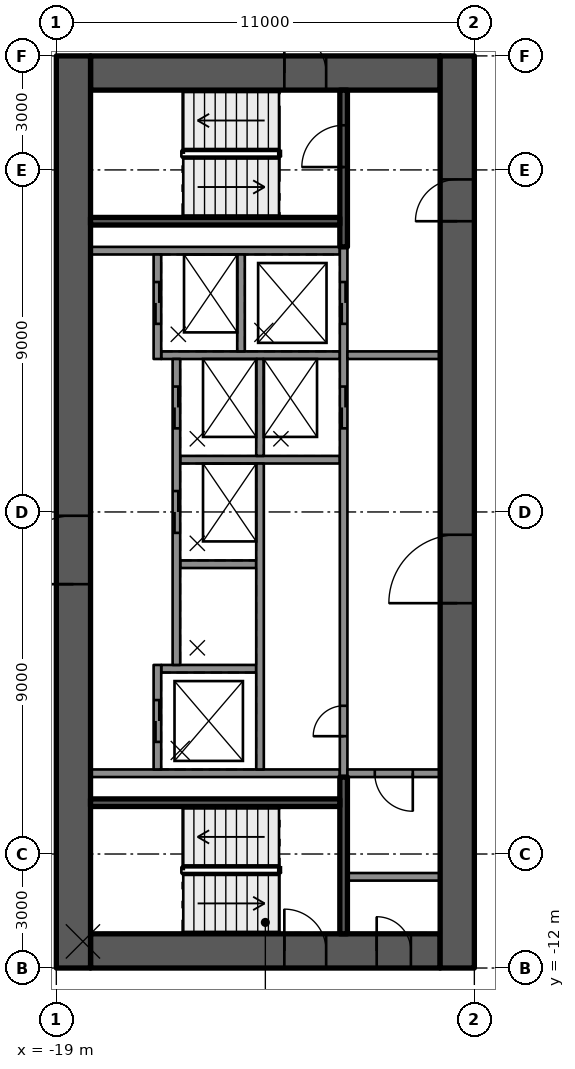
"""IFC4 building model, lengths in metres.
Left out: names, types, materials, properties, quantities, classifications, styles, units other than length and angle.
Written with IfcOpenShell. Run it as: python <this file> out.ifc"""

import sys

from ifc_helpers import new_model, si_unit, direction, frame, frame_2d, origin, place, context, subcontext, project, spatial, rectangle, extrude, element, fill, save


model = new_model("IFC4")
c1 = context("Model", 3, precision=1e-05, world=origin(), true_north=direction((0.0, 1.0)))
c2 = subcontext(c1, "Body", "Model", "MODEL_VIEW")
j1 = project(units=[si_unit("LENGTHUNIT", "METRE"), si_unit("PLANEANGLEUNIT", "RADIAN")], contexts=[c1])
p1 = place(None, origin())
s1 = spatial("IfcSite", under=j1, at=p1, CompositionType="ELEMENT")
p2 = place(p1, origin())
s2 = spatial("IfcBuilding", under=s1, at=p2, CompositionType="ELEMENT")
p3 = place(p2, frame((0.0, 0.0, 188.6)))
s3 = spatial("IfcBuildingStorey", under=s2, at=p3, CompositionType="ELEMENT", Elevation=188.6)
p4 = place(p3, frame((-18.1, 11.55, 0.0), z_axis=(0.0, 0.0, 1.0), x_axis=(1.0, 0.0, 0.0)))
e1 = element("IfcWall", 1, at=p4, inside=s3, PredefinedType="SHEAR", context=c2, shape_type="SweptSolid", body=[
    extrude(rectangle(XDim=9.2, YDim=0.9, at=frame_2d((4.6, 0.0))), origin(), (0.0, 0.0, 1.0), 3.5),
])
p5 = place(p4, frame((5.1, 0.0, 0.0)))
e2 = element("IfcOpeningElement", 2, at=p5, cuts=e1, PredefinedType="OPENING", context=c2, shape_type="SweptSolid", body=[
    extrude(rectangle(XDim=1.1, YDim=2.1, at=frame_2d((0.55, 1.05))), frame((0.0, 0.46, 0.0), z_axis=(0.0, -1.0, 0.0), x_axis=(1.0, 0.0, 0.0)), (0.0, 0.0, 1.0), 0.92),
])
p6 = place(p3, frame((-18.1, -11.55, 0.0), z_axis=(0.0, 0.0, 1.0), x_axis=(1.0, 0.0, 0.0)))
e3 = element("IfcWall", 3, at=p6, inside=s3, PredefinedType="SHEAR", context=c2, shape_type="SweptSolid", body=[
    extrude(rectangle(XDim=9.2, YDim=0.9, at=frame_2d((4.6, 0.0))), origin(), (0.0, 0.0, 1.0), 3.5),
])
p7 = place(p6, frame((5.1, 0.0, 0.0)))
e4 = element("IfcOpeningElement", 4, at=p7, cuts=e3, PredefinedType="OPENING", context=c2, shape_type="SweptSolid", body=[
    extrude(rectangle(XDim=1.1, YDim=2.1, at=frame_2d((0.55, 1.05))), frame((0.0, 0.46, 0.0), z_axis=(0.0, -1.0, 0.0), x_axis=(1.0, 0.0, 0.0)), (0.0, 0.0, 1.0), 0.92),
])
p8 = place(p6, frame((7.53, 0.0, 0.0)))
e5 = element("IfcOpeningElement", 5, at=p8, cuts=e3, PredefinedType="OPENING", context=c2, shape_type="SweptSolid", body=[
    extrude(rectangle(XDim=0.9, YDim=2.1, at=frame_2d((0.45, 1.05))), frame((0.0, 0.46, 0.0), z_axis=(0.0, -1.0, 0.0), x_axis=(1.0, 0.0, 0.0)), (0.0, 0.0, 1.0), 0.92),
])
p9 = place(p3, frame((-18.55, -12.0, 0.0), z_axis=(0.0, 0.0, 1.0), x_axis=(0.0, 1.0, 0.0)))
e6 = element("IfcWall", 6, at=p9, inside=s3, PredefinedType="SHEAR", context=c2, shape_type="SweptSolid", body=[
    extrude(rectangle(XDim=24.0, YDim=0.9, at=frame_2d((12.0, 0.0))), origin(), (0.0, 0.0, 1.0), 3.5),
])
p10 = place(p9, frame((10.1, 0.0, 0.0)))
e7 = element("IfcOpeningElement", 7, at=p10, cuts=e6, PredefinedType="OPENING", context=c2, shape_type="SweptSolid", body=[
    extrude(rectangle(XDim=1.8, YDim=2.1, at=frame_2d((0.9, 1.05))), frame((0.0, 0.46, 0.0), z_axis=(0.0, -1.0, 0.0), x_axis=(1.0, 0.0, 0.0)), (0.0, 0.0, 1.0), 0.92),
])
p11 = place(p3, frame((-8.45, -12.0, 0.0), z_axis=(0.0, 0.0, 1.0), x_axis=(0.0, 1.0, 0.0)))
e8 = element("IfcWall", 8, at=p11, inside=s3, PredefinedType="SHEAR", context=c2, shape_type="SweptSolid", body=[
    extrude(rectangle(XDim=24.0, YDim=0.9, at=frame_2d((12.0, 0.0))), origin(), (0.0, 0.0, 1.0), 3.5),
])
p12 = place(p11, frame((9.6, 0.0, 0.0)))
e9 = element("IfcOpeningElement", 9, at=p12, cuts=e8, PredefinedType="OPENING", context=c2, shape_type="SweptSolid", body=[
    extrude(rectangle(XDim=1.8, YDim=2.1, at=frame_2d((0.9, 1.05))), frame((0.0, 0.46, 0.0), z_axis=(0.0, -1.0, 0.0), x_axis=(1.0, 0.0, 0.0)), (0.0, 0.0, 1.0), 0.92),
])
p13 = place(p11, frame((19.65, 0.0, 0.0)))
e10 = element("IfcOpeningElement", 10, at=p13, cuts=e8, PredefinedType="OPENING", context=c2, shape_type="SweptSolid", body=[
    extrude(rectangle(XDim=1.1, YDim=2.1, at=frame_2d((0.55, 1.05))), frame((0.0, 0.46, 0.0), z_axis=(0.0, -1.0, 0.0), x_axis=(1.0, 0.0, 0.0)), (0.0, 0.0, 1.0), 0.92),
])
for number, where, z_axis, x_axis in (
    (11, (-11.54, 6.875, 0.0), (0.0, 0.0, 1.0), (-1.0, 0.0, 0.0)),
    (12, (-11.54, -6.875, 0.0), (0.0, 0.0, 1.0), (-1.0, 0.0, 0.0)),
):
    element("IfcWall", number, at=place(p3, frame(where, z_axis=z_axis, x_axis=x_axis)), inside=s3, PredefinedType="SOLIDWALL", context=c2, shape_type="SweptSolid", body=[
        extrude(rectangle(XDim=6.56, YDim=0.2, at=frame_2d((3.28, 0.0))), origin(), (0.0, 0.0, 1.0), 3.08),
    ])
p14 = place(p3, frame((-13.74, -4.125, 0.0), z_axis=(0.0, 0.0, 1.0), x_axis=(-1.0, 0.0, 0.0)))
e13 = element("IfcWall", 13, at=p14, inside=s3, PredefinedType="SOLIDWALL", context=c2, shape_type="SweptSolid", body=[
    extrude(rectangle(XDim=2.5, YDim=0.2, at=frame_2d((1.25, 0.0))), origin(), (0.0, 0.0, 1.0), 3.08),
])
p15 = place(p3, frame((-13.74, -1.375, 0.0), z_axis=(0.0, 0.0, 1.0), x_axis=(-1.0, 0.0, 0.0)))
e14 = element("IfcWall", 14, at=p15, inside=s3, PredefinedType="SOLIDWALL", context=c2, shape_type="SweptSolid", body=[
    extrude(rectangle(XDim=2.0, YDim=0.2, at=frame_2d((1.0, 0.0))), origin(), (0.0, 0.0, 1.0), 3.08),
])
p16 = place(p3, frame((-11.54, 1.375, 0.0), z_axis=(0.0, 0.0, 1.0), x_axis=(-1.0, 0.0, 0.0)))
e15 = element("IfcWall", 15, at=p16, inside=s3, PredefinedType="SOLIDWALL", context=c2, shape_type="SweptSolid", body=[
    extrude(rectangle(XDim=4.2, YDim=0.2, at=frame_2d((2.1, 0.0))), origin(), (0.0, 0.0, 1.0), 3.08),
])
p17 = place(p3, frame((-11.54, 4.125, 0.0), z_axis=(0.0, 0.0, 1.0), x_axis=(-1.0, 0.0, 0.0)))
e16 = element("IfcWall", 16, at=p17, inside=s3, PredefinedType="SOLIDWALL", context=c2, shape_type="SweptSolid", body=[
    extrude(rectangle(XDim=4.7, YDim=0.2, at=frame_2d((2.35, 0.0))), origin(), (0.0, 0.0, 1.0), 3.08),
])
p18 = place(p3, frame((-11.44, -6.975, 0.0), z_axis=(0.0, 0.0, 1.0), x_axis=(0.0, 1.0, 0.0)))
e17 = element("IfcWall", 17, at=p18, inside=s3, PredefinedType="SOLIDWALL", context=c2, shape_type="SweptSolid", body=[
    extrude(rectangle(XDim=13.95, YDim=0.2, at=frame_2d((6.975, 0.0))), origin(), (0.0, 0.0, 1.0), 3.08),
])
p19 = place(p18, frame((9.175, 0.0, 0.0)))
e18 = element("IfcOpeningElement", 18, at=p19, cuts=e17, PredefinedType="OPENING", context=c2, shape_type="SweptSolid", body=[
    extrude(rectangle(XDim=1.1, YDim=2.1, at=frame_2d((0.55, 1.05))), frame((0.0, 0.11, 0.0), z_axis=(0.0, -1.0, 0.0), x_axis=(1.0, 0.0, 0.0)), (0.0, 0.0, 1.0), 0.22),
])
p20 = place(p18, frame((11.925, 0.0, 0.0)))
e19 = element("IfcOpeningElement", 19, at=p20, cuts=e17, PredefinedType="OPENING", context=c2, shape_type="SweptSolid", body=[
    extrude(rectangle(XDim=1.1, YDim=2.1, at=frame_2d((0.55, 1.05))), frame((0.0, 0.11, 0.0), z_axis=(0.0, -1.0, 0.0), x_axis=(1.0, 0.0, 0.0)), (0.0, 0.0, 1.0), 0.22),
])
p21 = place(p18, frame((1.075, 0.0, 0.0)))
e20 = element("IfcOpeningElement", 20, at=p21, cuts=e17, PredefinedType="OPENING", context=c2, shape_type="SweptSolid", body=[
    extrude(rectangle(XDim=0.8, YDim=2.1, at=frame_2d((0.4, 1.05))), frame((0.0, 0.11, 0.0), z_axis=(0.0, -1.0, 0.0), x_axis=(1.0, 0.0, 0.0)), (0.0, 0.0, 1.0), 0.22),
])
p22 = place(p3, frame((-13.64, -6.775, 0.0), z_axis=(0.0, 0.0, 1.0), x_axis=(0.0, 1.0, 0.0)))
e21 = element("IfcWall", 21, at=p22, inside=s3, PredefinedType="SOLIDWALL", context=c2, shape_type="SweptSolid", body=[
    extrude(rectangle(XDim=8.05, YDim=0.2, at=frame_2d((4.025, 0.0))), origin(), (0.0, 0.0, 1.0), 3.08),
])
for number, where, z_axis, x_axis in (
    (22, (-13.64, 1.475, 0.0), (0.0, 0.0, 1.0), (0.0, 1.0, 0.0)),
    (23, (-14.14, 4.225, 0.0), (0.0, 0.0, 1.0), (0.0, 1.0, 0.0)),
):
    element("IfcWall", number, at=place(p3, frame(where, z_axis=z_axis, x_axis=x_axis)), inside=s3, PredefinedType="SOLIDWALL", context=c2, shape_type="SweptSolid", body=[
        extrude(rectangle(XDim=2.55, YDim=0.2, at=frame_2d((1.275, 0.0))), origin(), (0.0, 0.0, 1.0), 3.08),
    ])
p23 = place(p3, frame((-16.34, -6.775, 0.0), z_axis=(0.0, 0.0, 1.0), x_axis=(0.0, 1.0, 0.0)))
e24 = element("IfcWall", 24, at=p23, inside=s3, PredefinedType="SOLIDWALL", context=c2, shape_type="SweptSolid", body=[
    extrude(rectangle(XDim=2.75, YDim=0.2, at=frame_2d((1.375, 0.0))), origin(), (0.0, 0.0, 1.0), 3.08),
])
p24 = place(p23, frame((0.725, 0.0, 0.0)))
e25 = element("IfcOpeningElement", 25, at=p24, cuts=e24, PredefinedType="OPENING", context=c2, shape_type="SweptSolid", body=[
    extrude(rectangle(XDim=1.1, YDim=2.1, at=frame_2d((0.55, 1.05))), frame((0.0, 0.11, 0.0), z_axis=(0.0, -1.0, 0.0), x_axis=(1.0, 0.0, 0.0)), (0.0, 0.0, 1.0), 0.22),
])
p25 = place(p3, frame((-15.84, -4.025, 0.0), z_axis=(0.0, 0.0, 1.0), x_axis=(0.0, 1.0, 0.0)))
e26 = element("IfcWall", 26, at=p25, inside=s3, PredefinedType="SOLIDWALL", context=c2, shape_type="SweptSolid", body=[
    extrude(rectangle(XDim=8.05, YDim=0.2, at=frame_2d((4.025, 0.0))), origin(), (0.0, 0.0, 1.0), 3.08),
])
p26 = place(p25, frame((3.475, 0.0, 0.0)))
e27 = element("IfcOpeningElement", 27, at=p26, cuts=e26, PredefinedType="OPENING", context=c2, shape_type="SweptSolid", body=[
    extrude(rectangle(XDim=1.1, YDim=2.1, at=frame_2d((0.55, 1.05))), frame((0.0, 0.11, 0.0), z_axis=(0.0, -1.0, 0.0), x_axis=(1.0, 0.0, 0.0)), (0.0, 0.0, 1.0), 0.22),
])
p27 = place(p25, frame((6.225, 0.0, 0.0)))
e28 = element("IfcOpeningElement", 28, at=p27, cuts=e26, PredefinedType="OPENING", context=c2, shape_type="SweptSolid", body=[
    extrude(rectangle(XDim=1.1, YDim=2.1, at=frame_2d((0.55, 1.05))), frame((0.0, 0.11, 0.0), z_axis=(0.0, -1.0, 0.0), x_axis=(1.0, 0.0, 0.0)), (0.0, 0.0, 1.0), 0.22),
])
p28 = place(p3, frame((-16.34, 4.025, 0.0), z_axis=(0.0, 0.0, 1.0), x_axis=(0.0, 1.0, 0.0)))
e29 = element("IfcWall", 29, at=p28, inside=s3, PredefinedType="SOLIDWALL", context=c2, shape_type="SweptSolid", body=[
    extrude(rectangle(XDim=2.75, YDim=0.2, at=frame_2d((1.375, 0.0))), origin(), (0.0, 0.0, 1.0), 3.08),
])
p29 = place(p28, frame((0.925, 0.0, 0.0)))
e30 = element("IfcOpeningElement", 30, at=p29, cuts=e29, PredefinedType="OPENING", context=c2, shape_type="SweptSolid", body=[
    extrude(rectangle(XDim=1.1, YDim=2.1, at=frame_2d((0.55, 1.05))), frame((0.0, 0.11, 0.0), z_axis=(0.0, -1.0, 0.0), x_axis=(1.0, 0.0, 0.0)), (0.0, 0.0, 1.0), 0.22),
])
p30 = place(p3, frame((-11.44, 6.975, 0.0), z_axis=(0.0, 0.0, 1.0), x_axis=(0.0, 1.0, 0.0)))
e31 = element("IfcWall", 31, at=p30, inside=s3, PredefinedType="SOLIDWALL", context=c2, shape_type="SweptSolid", body=[
    extrude(rectangle(XDim=4.125, YDim=0.2, at=frame_2d((2.062, 0.0))), origin(), (0.0, 0.0, 1.0), 3.08),
])
p31 = place(p30, frame((2.1, 0.0, 0.0)))
e32 = element("IfcOpeningElement", 32, at=p31, cuts=e31, PredefinedType="OPENING", context=c2, shape_type="SweptSolid", body=[
    extrude(rectangle(XDim=1.1, YDim=2.1, at=frame_2d((0.55, 1.05))), frame((0.0, 0.11, 0.0), z_axis=(0.0, -1.0, 0.0), x_axis=(1.0, 0.0, 0.0)), (0.0, 0.0, 1.0), 0.22),
])
p32 = place(p3, frame((-11.54, 7.65, 0.0), z_axis=(0.0, 0.0, 1.0), x_axis=(-1.0, 0.0, 0.0)))
e33 = element("IfcWall", 33, at=p32, inside=s3, PredefinedType="SOLIDWALL", context=c2, shape_type="SweptSolid", body=[
    extrude(rectangle(XDim=6.56, YDim=0.2, at=frame_2d((3.28, 0.0))), origin(), (0.0, 0.0, 1.0), 3.08),
])
p33 = place(p3, frame((-11.44, -11.1, 0.0), z_axis=(0.0, 0.0, 1.0), x_axis=(0.0, 1.0, 0.0)))
e34 = element("IfcWall", 34, at=p33, inside=s3, PredefinedType="SOLIDWALL", context=c2, shape_type="SweptSolid", body=[
    extrude(rectangle(XDim=4.125, YDim=0.2, at=frame_2d((2.062, 0.0))), origin(), (0.0, 0.0, 1.0), 3.08),
])
p34 = place(p3, frame((-11.54, -7.65, 0.0), z_axis=(0.0, 0.0, 1.0), x_axis=(-1.0, 0.0, 0.0)))
e35 = element("IfcWall", 35, at=p34, inside=s3, PredefinedType="SOLIDWALL", context=c2, shape_type="SweptSolid", body=[
    extrude(rectangle(XDim=6.56, YDim=0.2, at=frame_2d((3.28, 0.0))), origin(), (0.0, 0.0, 1.0), 3.08),
])
p35 = place(p3, frame((-8.9, 4.125, 0.0), z_axis=(0.0, 0.0, 1.0), x_axis=(-1.0, 0.0, 0.0)))
e36 = element("IfcWall", 36, at=p35, inside=s3, PredefinedType="PARTITIONING", context=c2, shape_type="SweptSolid", body=[
    extrude(rectangle(XDim=2.44, YDim=0.2, at=frame_2d((1.22, 0.0))), origin(), (0.0, 0.0, 1.0), 3.08),
])
p36 = place(p3, frame((-8.9, -6.875, 0.0), z_axis=(0.0, 0.0, 1.0), x_axis=(-1.0, 0.0, 0.0)))
e37 = element("IfcWall", 37, at=p36, inside=s3, PredefinedType="PARTITIONING", context=c2, shape_type="SweptSolid", body=[
    extrude(rectangle(XDim=2.44, YDim=0.2, at=frame_2d((1.22, 0.0))), origin(), (0.0, 0.0, 1.0), 3.08),
])
p37 = place(p36, frame((0.72, 0.0, 0.0)))
e38 = element("IfcOpeningElement", 38, at=p37, cuts=e37, PredefinedType="OPENING", context=c2, shape_type="SweptSolid", body=[
    extrude(rectangle(XDim=1.0, YDim=2.1, at=frame_2d((0.5, 1.05))), frame((0.0, 0.11, 0.0), z_axis=(0.0, -1.0, 0.0), x_axis=(1.0, 0.0, 0.0)), (0.0, 0.0, 1.0), 0.22),
])
p38 = place(p3, frame((-8.9, -9.6, 0.0), z_axis=(0.0, 0.0, 1.0), x_axis=(-1.0, 0.0, 0.0)))
e39 = element("IfcWall", 39, at=p38, inside=s3, PredefinedType="PARTITIONING", context=c2, shape_type="SweptSolid", body=[
    extrude(rectangle(XDim=2.44, YDim=0.2, at=frame_2d((1.22, 0.0))), origin(), (0.0, 0.0, 1.0), 3.08),
])
p39 = place(p24, origin())
e40 = element("IfcDoor", 40, at=p39, inside=s3, OperationType="DOUBLE_DOOR_SLIDING", PredefinedType="DOOR", context=c2, shape_type="SweptSolid", body=[
    extrude(rectangle(XDim=1.1, YDim=2.1, at=frame_2d((0.55, 1.05))), frame((0.0, 0.025, 0.0), z_axis=(0.0, -1.0, 0.0), x_axis=(1.0, 0.0, 0.0)), (0.0, 0.0, 1.0), 0.05),
])
fill(e25, e40)
p40 = place(p26, origin())
e41 = element("IfcDoor", 41, at=p40, inside=s3, OperationType="DOUBLE_DOOR_SLIDING", PredefinedType="DOOR", context=c2, shape_type="SweptSolid", body=[
    extrude(rectangle(XDim=1.1, YDim=2.1, at=frame_2d((0.55, 1.05))), frame((0.0, 0.025, 0.0), z_axis=(0.0, -1.0, 0.0), x_axis=(1.0, 0.0, 0.0)), (0.0, 0.0, 1.0), 0.05),
])
fill(e27, e41)
p41 = place(p19, origin())
e42 = element("IfcDoor", 42, at=p41, inside=s3, OperationType="DOUBLE_DOOR_SLIDING", PredefinedType="DOOR", context=c2, shape_type="SweptSolid", body=[
    extrude(rectangle(XDim=1.1, YDim=2.1, at=frame_2d((0.55, 1.05))), frame((0.0, 0.025, 0.0), z_axis=(0.0, -1.0, 0.0), x_axis=(1.0, 0.0, 0.0)), (0.0, 0.0, 1.0), 0.05),
])
fill(e18, e42)
p42 = place(p27, origin())
e43 = element("IfcDoor", 43, at=p42, inside=s3, OperationType="DOUBLE_DOOR_SLIDING", PredefinedType="DOOR", context=c2, shape_type="SweptSolid", body=[
    extrude(rectangle(XDim=1.1, YDim=2.1, at=frame_2d((0.55, 1.05))), frame((0.0, 0.025, 0.0), z_axis=(0.0, -1.0, 0.0), x_axis=(1.0, 0.0, 0.0)), (0.0, 0.0, 1.0), 0.05),
])
fill(e28, e43)
p43 = place(p20, origin())
e44 = element("IfcDoor", 44, at=p43, inside=s3, OperationType="DOUBLE_DOOR_SLIDING", PredefinedType="DOOR", context=c2, shape_type="SweptSolid", body=[
    extrude(rectangle(XDim=1.1, YDim=2.1, at=frame_2d((0.55, 1.05))), frame((0.0, 0.025, 0.0), z_axis=(0.0, -1.0, 0.0), x_axis=(1.0, 0.0, 0.0)), (0.0, 0.0, 1.0), 0.05),
])
fill(e19, e44)
p44 = place(p29, origin())
e45 = element("IfcDoor", 45, at=p44, inside=s3, OperationType="DOUBLE_DOOR_SLIDING", PredefinedType="DOOR", context=c2, shape_type="SweptSolid", body=[
    extrude(rectangle(XDim=1.1, YDim=2.1, at=frame_2d((0.55, 1.05))), frame((0.0, 0.025, 0.0), z_axis=(0.0, -1.0, 0.0), x_axis=(1.0, 0.0, 0.0)), (0.0, 0.0, 1.0), 0.05),
])
fill(e30, e45)
p45 = place(p21, origin())
e46 = element("IfcDoor", 46, at=p45, inside=s3, OperationType="SINGLE_SWING_LEFT", PredefinedType="DOOR", context=c2, shape_type="SweptSolid", body=[
    extrude(rectangle(XDim=0.8, YDim=2.1, at=frame_2d((0.4, 1.05))), frame((0.0, 0.025, 0.0), z_axis=(0.0, -1.0, 0.0), x_axis=(1.0, 0.0, 0.0)), (0.0, 0.0, 1.0), 0.05),
])
fill(e20, e46)
p46 = place(p12, origin())
e47 = element("IfcDoor", 47, at=p46, inside=s3, OperationType="SINGLE_SWING_LEFT", PredefinedType="DOOR", context=c2, shape_type="SweptSolid", body=[
    extrude(rectangle(XDim=1.8, YDim=2.1, at=frame_2d((0.9, 1.05))), frame((0.0, 0.025, 0.0), z_axis=(0.0, -1.0, 0.0), x_axis=(1.0, 0.0, 0.0)), (0.0, 0.0, 1.0), 0.05),
])
fill(e9, e47)
p47 = place(p10, origin())
e48 = element("IfcDoor", 48, at=p47, inside=s3, OperationType="SINGLE_SWING_LEFT", PredefinedType="DOOR", context=c2, shape_type="SweptSolid", body=[
    extrude(rectangle(XDim=1.8, YDim=2.1, at=frame_2d((0.9, 1.05))), frame((0.0, 0.025, 0.0), z_axis=(0.0, -1.0, 0.0), x_axis=(1.0, 0.0, 0.0)), (0.0, 0.0, 1.0), 0.05),
])
fill(e7, e48)
p48 = place(p13, origin())
e49 = element("IfcDoor", 49, at=p48, inside=s3, OperationType="SINGLE_SWING_RIGHT", PredefinedType="DOOR", context=c2, shape_type="SweptSolid", body=[
    extrude(rectangle(XDim=1.1, YDim=2.1, at=frame_2d((0.55, 1.05))), frame((0.0, 0.025, 0.0), z_axis=(0.0, -1.0, 0.0), x_axis=(1.0, 0.0, 0.0)), (0.0, 0.0, 1.0), 0.05),
])
fill(e10, e49)
p49 = place(p5, origin())
e50 = element("IfcDoor", 50, at=p49, inside=s3, OperationType="SINGLE_SWING_RIGHT", PredefinedType="DOOR", context=c2, shape_type="SweptSolid", body=[
    extrude(rectangle(XDim=1.1, YDim=2.1, at=frame_2d((0.55, 1.05))), frame((0.0, 0.025, 0.0), z_axis=(0.0, -1.0, 0.0), x_axis=(1.0, 0.0, 0.0)), (0.0, 0.0, 1.0), 0.05),
])
fill(e2, e50)
p50 = place(p7, origin())
e51 = element("IfcDoor", 51, at=p50, inside=s3, OperationType="SINGLE_SWING_RIGHT", PredefinedType="DOOR", context=c2, shape_type="SweptSolid", body=[
    extrude(rectangle(XDim=1.1, YDim=2.1, at=frame_2d((0.55, 1.05))), frame((0.0, 0.025, 0.0), z_axis=(0.0, -1.0, 0.0), x_axis=(1.0, 0.0, 0.0)), (0.0, 0.0, 1.0), 0.05),
])
fill(e4, e51)
p51 = place(p31, origin())
e52 = element("IfcDoor", 52, at=p51, inside=s3, OperationType="SINGLE_SWING_RIGHT", PredefinedType="DOOR", context=c2, shape_type="SweptSolid", body=[
    extrude(rectangle(XDim=1.1, YDim=2.1, at=frame_2d((0.55, 1.05))), frame((0.0, 0.025, 0.0), z_axis=(0.0, -1.0, 0.0), x_axis=(1.0, 0.0, 0.0)), (0.0, 0.0, 1.0), 0.05),
])
fill(e32, e52)
p52 = place(p8, origin())
e53 = element("IfcDoor", 53, at=p52, inside=s3, OperationType="SINGLE_SWING_RIGHT", PredefinedType="DOOR", context=c2, shape_type="SweptSolid", body=[
    extrude(rectangle(XDim=0.9, YDim=2.1, at=frame_2d((0.45, 1.05))), frame((0.0, 0.025, 0.0), z_axis=(0.0, -1.0, 0.0), x_axis=(1.0, 0.0, 0.0)), (0.0, 0.0, 1.0), 0.05),
])
fill(e5, e53)
p53 = place(p37, origin())
e54 = element("IfcDoor", 54, at=p53, inside=s3, OperationType="SINGLE_SWING_RIGHT", PredefinedType="DOOR", context=c2, shape_type="SweptSolid", body=[
    extrude(rectangle(XDim=1.0, YDim=2.1, at=frame_2d((0.5, 1.05))), frame((0.0, 0.025, 0.0), z_axis=(0.0, -1.0, 0.0), x_axis=(1.0, 0.0, 0.0)), (0.0, 0.0, 1.0), 0.05),
])
fill(e38, e54)
save(model, sys.argv[1])
